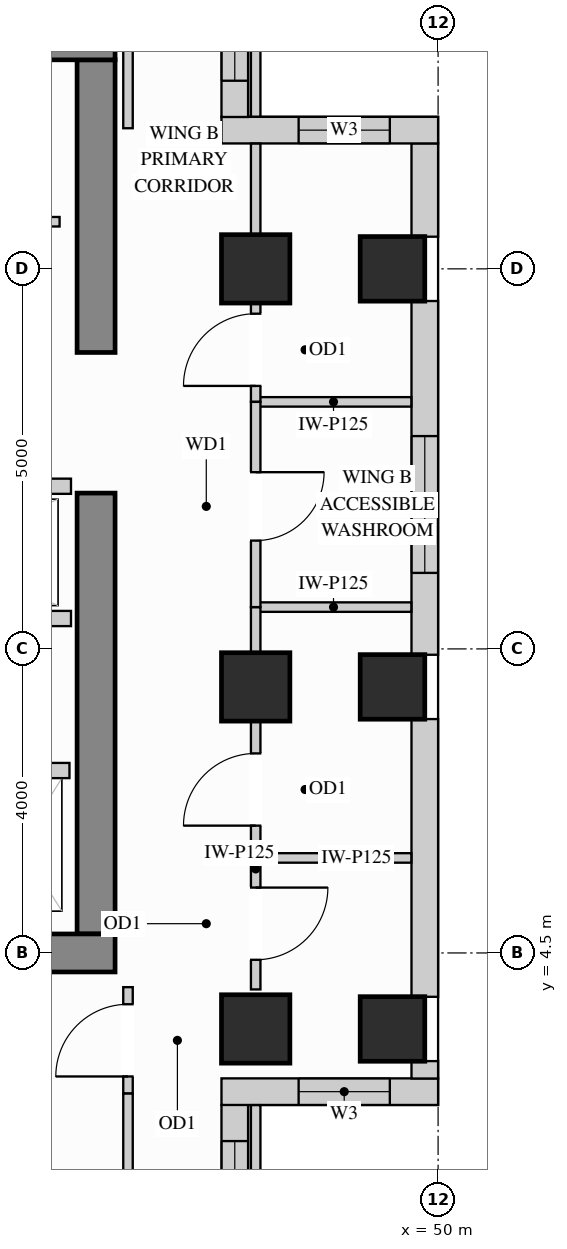
"""IFC4 building model, lengths in metres.
Left out: names, types, materials, properties, quantities, classifications, styles, units other than length and angle.
Written with IfcOpenShell. Run it as: python <this file> out.ifc"""

import sys

from ifc_helpers import new_model, si_unit, direction, frame, frame_2d, origin, origin_2d, place, context, subcontext, project, spatial, rectangle, extrude, source, transform, mapped, element, fill, save


model = new_model("IFC4")
c1 = context("Model", 3, precision=1e-05, world=origin(), true_north=direction((0.0, 1.0)))
c2 = subcontext(c1, "Body", "Model", "MODEL_VIEW")
j1 = project(units=[si_unit("LENGTHUNIT", "METRE"), si_unit("PLANEANGLEUNIT", "RADIAN")], contexts=[c1])
p1 = place(None, origin())
s1 = spatial("IfcSite", under=j1, at=p1, CompositionType="ELEMENT")
p2 = place(p1, origin())
s2 = spatial("IfcBuilding", under=s1, at=p2, CompositionType="ELEMENT")
p3 = place(p2, frame((0.0, 0.0, 223.2)))
s3 = spatial("IfcBuildingStorey", under=s2, at=p3, CompositionType="ELEMENT", Elevation=223.2)
m1 = source(origin(), c2, "Body", "SweptSolid", [
    extrude(rectangle(XDim=0.9, YDim=0.9, at=origin_2d()), origin(), (0.0, 0.0, 1.0), 3.4),
])
for number, where, z_axis, x_axis in (
    (1, (47.6, 13.5, 0.0), (0.0, 0.0, 1.0), (1.0, 0.0, 0.0)),
    (2, (47.6, 3.5, 0.0), (0.0, 0.0, 1.0), (1.0, 0.0, 0.0)),
    (3, (47.6, 8.0, 0.0), (0.0, 0.0, 1.0), (1.0, 0.0, 0.0)),
):
    element("IfcColumn", number, at=place(p3, frame(where, z_axis=z_axis, x_axis=x_axis)), inside=s3, PredefinedType="COLUMN", context=c2, shape_type="MappedRepresentation", body=[
        mapped(m1, transform((0.0, 0.0, 0.0), x_axis=(1.0, 0.0, 0.0), y_axis=(0.0, 1.0, 0.0), z_axis=(0.0, 0.0, 1.0))),
    ])
m2 = source(origin(), c2, "Body", "SweptSolid", [
    extrude(rectangle(XDim=0.85, YDim=0.85, at=origin_2d()), origin(), (0.0, 0.0, 1.0), 3.4),
])
for number, where, z_axis, x_axis in (
    (4, (49.4, 13.5, 0.0), (0.0, 0.0, 1.0), (1.0, 0.0, 0.0)),
    (5, (49.4, 3.5, 0.0), (0.0, 0.0, 1.0), (1.0, 0.0, 0.0)),
    (6, (49.4, 8.0, 0.0), (0.0, 0.0, 1.0), (1.0, 0.0, 0.0)),
):
    element("IfcColumn", number, at=place(p3, frame(where, z_axis=z_axis, x_axis=x_axis)), inside=s3, PredefinedType="COLUMN", context=c2, shape_type="MappedRepresentation", body=[
        mapped(m2, transform((0.0, 0.0, 0.0), x_axis=(1.0, 0.0, 0.0), y_axis=(0.0, 1.0, 0.0), z_axis=(0.0, 0.0, 1.0))),
    ])
m3 = source(origin(), c2, "Body", "SweptSolid", [
    extrude(rectangle(XDim=5.8, YDim=0.5, at=frame_2d((2.9, 0.0))), origin(), (0.0, 0.0, 1.0), 3.4),
])
p4 = place(p3, frame((45.5, 4.75, 0.0), z_axis=(0.0, 0.0, 1.0), x_axis=(0.0, 1.0, 0.0)))
e7 = element("IfcWall", 7, at=p4, inside=s3, PredefinedType="SHEAR", context=c2, shape_type="MappedRepresentation", body=[
    mapped(m3, transform((0.0, 0.0, 0.0), x_axis=(1.0, 0.0, 0.0), y_axis=(0.0, 1.0, 0.0), z_axis=(0.0, 0.0, 1.0))),
])
m4 = source(origin(), c2, "Body", "SweptSolid", [
    extrude(rectangle(XDim=3.85, YDim=0.5, at=frame_2d((1.925, 0.0))), origin(), (0.0, 0.0, 1.0), 3.4),
])
p5 = place(p3, frame((45.5, 12.4, 0.0), z_axis=(0.0, 0.0, 1.0), x_axis=(0.0, 1.0, 0.0)))
e8 = element("IfcWall", 8, at=p5, inside=s3, PredefinedType="SHEAR", context=c2, shape_type="MappedRepresentation", body=[
    mapped(m4, transform((0.0, 0.0, 0.0), x_axis=(1.0, 0.0, 0.0), y_axis=(0.0, 1.0, 0.0), z_axis=(0.0, 0.0, 1.0))),
])
m5 = source(origin(), c2, "Body", "SweptSolid", [
    extrude(rectangle(XDim=10.0, YDim=0.5, at=frame_2d((5.0, 0.0))), origin(), (0.0, 0.0, 1.0), 3.4),
])
for number, where, z_axis, x_axis in (
    (9, (35.75, 16.5, 0.0), (0.0, 0.0, 1.0), (1.0, 0.0, 0.0)),
    (10, (35.75, 4.5, 0.0), (0.0, 0.0, 1.0), (1.0, 0.0, 0.0)),
):
    element("IfcWall", number, at=place(p3, frame(where, z_axis=z_axis, x_axis=x_axis)), inside=s3, PredefinedType="SHEAR", context=c2, shape_type="MappedRepresentation", body=[
        mapped(m5, transform((0.0, 0.0, 0.0), x_axis=(1.0, 0.0, 0.0), y_axis=(0.0, 1.0, 0.0), z_axis=(0.0, 0.0, 1.0))),
    ])
p6 = place(p3, frame((47.325, 0.348, 0.0), z_axis=(0.0, 0.0, 1.0), x_axis=(0.0, 1.0, 0.0)))
e11 = element("IfcWall", 11, at=p6, inside=s3, PredefinedType="SOLIDWALL", context=c2, shape_type="SweptSolid", body=[
    extrude(rectangle(XDim=2.154, YDim=0.35, at=frame_2d((1.077, 0.0))), origin(), (0.0, 0.0, 1.0), 3.385),
])
p7 = place(p6, frame((0.477, 0.0, 0.78)))
e12 = element("IfcOpeningElement", 12, at=p7, cuts=e11, PredefinedType="OPENING", context=c2, shape_type="SweptSolid", body=[
    extrude(rectangle(XDim=1.2, YDim=2.1, at=frame_2d((0.6, 1.05))), frame((0.0, 0.185, 0.0), z_axis=(0.0, -1.0, 0.0), x_axis=(1.0, 0.0, 0.0)), (0.0, 0.0, 1.0), 0.37),
])
p8 = place(p3, frame((47.15, 2.675, 0.0), z_axis=(0.0, 0.0, 1.0), x_axis=(1.0, 0.0, 0.0)))
e13 = element("IfcWall", 13, at=p8, inside=s3, PredefinedType="SOLIDWALL", context=c2, shape_type="SweptSolid", body=[
    extrude(rectangle(XDim=2.85, YDim=0.35, at=frame_2d((1.425, 0.0))), origin(), (0.0, 0.0, 1.0), 3.385),
])
p9 = place(p8, frame((1.015, 0.0, 0.78)))
e14 = element("IfcOpeningElement", 14, at=p9, cuts=e13, PredefinedType="OPENING", context=c2, shape_type="SweptSolid", body=[
    extrude(rectangle(XDim=1.2, YDim=2.1, at=frame_2d((0.6, 1.05))), frame((0.0, 0.185, 0.0), z_axis=(0.0, -1.0, 0.0), x_axis=(1.0, 0.0, 0.0)), (0.0, 0.0, 1.0), 0.37),
])
m6 = source(origin(), c2, "Body", "SweptSolid", [
    extrude(rectangle(XDim=0.229, YDim=0.35, at=frame_2d((0.115, 0.0))), origin(), (0.0, 0.0, 1.0), 3.385),
])
p10 = place(p3, frame((49.825, 2.848, 0.0), z_axis=(0.0, 0.0, 1.0), x_axis=(0.0, 1.0, 0.0)))
e15 = element("IfcWall", 15, at=p10, inside=s3, PredefinedType="SOLIDWALL", context=c2, shape_type="MappedRepresentation", body=[
    mapped(m6, transform((0.0, 0.0, 0.0), x_axis=(1.0, 0.0, 0.0), y_axis=(0.0, 1.0, 0.0), z_axis=(0.0, 0.0, 1.0))),
])
m7 = source(origin(), c2, "Body", "SweptSolid", [
    extrude(rectangle(XDim=3.654, YDim=0.35, at=frame_2d((1.827, 0.0))), origin(), (0.0, 0.0, 1.0), 3.385),
])
p11 = place(p3, frame((49.825, 3.923, 0.0), z_axis=(0.0, 0.0, 1.0), x_axis=(0.0, 1.0, 0.0)))
e16 = element("IfcWall", 16, at=p11, inside=s3, PredefinedType="SOLIDWALL", context=c2, shape_type="MappedRepresentation", body=[
    mapped(m7, transform((0.0, 0.0, 0.0), x_axis=(1.0, 0.0, 0.0), y_axis=(0.0, 1.0, 0.0), z_axis=(0.0, 0.0, 1.0))),
])
p12 = place(p3, frame((49.825, 8.423, 0.0), z_axis=(0.0, 0.0, 1.0), x_axis=(0.0, 1.0, 0.0)))
e17 = element("IfcWall", 17, at=p12, inside=s3, PredefinedType="SOLIDWALL", context=c2, shape_type="SweptSolid", body=[
    extrude(rectangle(XDim=4.654, YDim=0.35, at=frame_2d((2.327, 0.0))), origin(), (0.0, 0.0, 1.0), 3.385),
])
p13 = place(p12, frame((1.077, 0.0, 0.78)))
e18 = element("IfcOpeningElement", 18, at=p13, cuts=e17, PredefinedType="OPENING", context=c2, shape_type="SweptSolid", body=[
    extrude(rectangle(XDim=1.8, YDim=2.1, at=frame_2d((0.9, 1.05))), frame((0.0, 0.185, 0.0), z_axis=(0.0, -1.0, 0.0), x_axis=(1.0, 0.0, 0.0)), (0.0, 0.0, 1.0), 0.37),
])
m8 = source(origin(), c2, "Body", "SweptSolid", [
    extrude(rectangle(XDim=1.229, YDim=0.35, at=frame_2d((0.615, 0.0))), origin(), (0.0, 0.0, 1.0), 3.385),
])
p14 = place(p3, frame((49.825, 13.923, 0.0), z_axis=(0.0, 0.0, 1.0), x_axis=(0.0, 1.0, 0.0)))
e19 = element("IfcWall", 19, at=p14, inside=s3, PredefinedType="SOLIDWALL", context=c2, shape_type="MappedRepresentation", body=[
    mapped(m8, transform((0.0, 0.0, 0.0), x_axis=(1.0, 0.0, 0.0), y_axis=(0.0, 1.0, 0.0), z_axis=(0.0, 0.0, 1.0))),
])
p15 = place(p3, frame((50.0, 15.325, 0.0), z_axis=(0.0, 0.0, 1.0), x_axis=(-1.0, 0.0, 0.0)))
e20 = element("IfcWall", 20, at=p15, inside=s3, PredefinedType="SOLIDWALL", context=c2, shape_type="SweptSolid", body=[
    extrude(rectangle(XDim=2.85, YDim=0.35, at=frame_2d((1.425, 0.0))), origin(), (0.0, 0.0, 1.0), 3.385),
])
p16 = place(p15, frame((0.635, 0.0, 0.78)))
e21 = element("IfcOpeningElement", 21, at=p16, cuts=e20, PredefinedType="OPENING", context=c2, shape_type="SweptSolid", body=[
    extrude(rectangle(XDim=1.2, YDim=2.1, at=frame_2d((0.6, 1.05))), frame((0.0, 0.185, 0.0), z_axis=(0.0, -1.0, 0.0), x_axis=(1.0, 0.0, 0.0)), (0.0, 0.0, 1.0), 0.37),
])
p17 = place(p3, frame((47.325, 15.498, 0.0), z_axis=(0.0, 0.0, 1.0), x_axis=(0.0, 1.0, 0.0)))
e22 = element("IfcWall", 22, at=p17, inside=s3, PredefinedType="SOLIDWALL", context=c2, shape_type="SweptSolid", body=[
    extrude(rectangle(XDim=2.154, YDim=0.35, at=frame_2d((1.077, 0.0))), origin(), (0.0, 0.0, 1.0), 3.385),
])
p18 = place(p17, frame((0.477, 0.0, 0.78)))
e23 = element("IfcOpeningElement", 23, at=p18, cuts=e22, PredefinedType="OPENING", context=c2, shape_type="SweptSolid", body=[
    extrude(rectangle(XDim=1.2, YDim=2.1, at=frame_2d((0.6, 1.05))), frame((0.0, 0.185, 0.0), z_axis=(0.0, -1.0, 0.0), x_axis=(1.0, 0.0, 0.0)), (0.0, 0.0, 1.0), 0.37),
])
p19 = place(p3, frame((36.5, 14.12, 0.0), z_axis=(0.0, 0.0, 1.0), x_axis=(1.0, 0.0, 0.0)))
e24 = element("IfcWall", 24, at=p19, inside=s3, PredefinedType="PARTITIONING", context=c2, shape_type="SweptSolid", body=[
    extrude(rectangle(XDim=8.52, YDim=0.125, at=frame_2d((4.26, 0.0))), origin(), (0.0, 0.0, 1.0), 3.385),
])
p20 = place(p19, frame((3.785, 0.0, 0.0)))
e25 = element("IfcOpeningElement", 25, at=p20, cuts=e24, PredefinedType="OPENING", context=c2, shape_type="SweptSolid", body=[
    extrude(rectangle(XDim=0.95, YDim=2.15, at=frame_2d((0.475, 1.075))), frame((0.0, 0.073, 0.0), z_axis=(0.0, -1.0, 0.0), x_axis=(1.0, 0.0, 0.0)), (0.0, 0.0, 1.0), 0.145),
])
m9 = source(origin(), c2, "Body", "SweptSolid", [
    extrude(rectangle(XDim=2.048, YDim=0.125, at=frame_2d((1.024, 0.0))), origin(), (0.0, 0.0, 1.0), 2.916),
])
p21 = place(p3, frame((47.6, 11.75, 0.0), z_axis=(0.0, 0.0, 1.0), x_axis=(1.0, 0.0, 0.0)))
e26 = element("IfcWall", 26, at=p21, inside=s3, PredefinedType="PARTITIONING", context=c2, shape_type="MappedRepresentation", body=[
    mapped(m9, transform((0.0, 0.0, 0.0), x_axis=(1.0, 0.0, 0.0), y_axis=(0.0, 1.0, 0.0), z_axis=(0.0, 0.0, 1.0))),
])
m10 = source(origin(), c2, "Body", "SweptSolid", [
    extrude(rectangle(XDim=2.048, YDim=0.125, at=frame_2d((1.024, 0.0))), origin(), (0.0, 0.0, 1.0), 3.385),
])
for number, where, z_axis, x_axis in (
    (27, (47.6, 5.75, 0.0), (0.0, 0.0, 1.0), (1.0, 0.0, 0.0)),
    (28, (47.6, 9.05, 0.0), (0.0, 0.0, 1.0), (1.0, 0.0, 0.0)),
):
    element("IfcWall", number, at=place(p3, frame(where, z_axis=z_axis, x_axis=x_axis)), inside=s3, PredefinedType="PARTITIONING", context=c2, shape_type="MappedRepresentation", body=[
        mapped(m10, transform((0.0, 0.0, 0.0), x_axis=(1.0, 0.0, 0.0), y_axis=(0.0, 1.0, 0.0), z_axis=(0.0, 0.0, 1.0))),
    ])
p22 = place(p3, frame((47.6, 4.02, 0.0), z_axis=(0.0, 0.0, 1.0), x_axis=(0.0, 1.0, 0.0)))
e29 = element("IfcWall", 29, at=p22, inside=s3, PredefinedType="PARTITIONING", context=c2, shape_type="SweptSolid", body=[
    extrude(rectangle(XDim=1.73, YDim=0.125, at=frame_2d((0.865, 0.0))), origin(), (0.0, 0.0, 1.0), 2.773),
])
p23 = place(p22, frame((0.39, 0.0, 0.0)))
e30 = element("IfcOpeningElement", 30, at=p23, cuts=e29, PredefinedType="OPENING", context=c2, shape_type="SweptSolid", body=[
    extrude(rectangle(XDim=0.95, YDim=2.15, at=frame_2d((0.475, 1.075))), frame((0.0, 0.073, 0.0), z_axis=(0.0, -1.0, 0.0), x_axis=(1.0, 0.0, 0.0)), (0.0, 0.0, 1.0), 0.145),
])
m11 = source(origin(), c2, "Body", "SweptSolid", [
    extrude(rectangle(XDim=2.148, YDim=0.125, at=frame_2d((1.074, 0.0))), origin(), (0.0, 0.0, 1.0), 3.385),
])
p24 = place(p3, frame((47.6, 0.35, 0.0), z_axis=(0.0, 0.0, 1.0), x_axis=(0.0, 1.0, 0.0)))
e31 = element("IfcWall", 31, at=p24, inside=s3, PredefinedType="PARTITIONING", context=c2, shape_type="MappedRepresentation", body=[
    mapped(m11, transform((0.0, 0.0, 0.0), x_axis=(1.0, 0.0, 0.0), y_axis=(0.0, 1.0, 0.0), z_axis=(0.0, 0.0, 1.0))),
])
p25 = place(p3, frame((47.6, 5.75, 0.0), z_axis=(0.0, 0.0, 1.0), x_axis=(0.0, 1.0, 0.0)))
e32 = element("IfcWall", 32, at=p25, inside=s3, PredefinedType="PARTITIONING", context=c2, shape_type="SweptSolid", body=[
    extrude(rectangle(XDim=1.8, YDim=0.125, at=frame_2d((0.9, 0.0))), origin(), (0.0, 0.0, 1.0), 2.773),
])
p26 = place(p25, frame((0.425, 0.0, 0.0)))
e33 = element("IfcOpeningElement", 33, at=p26, cuts=e32, PredefinedType="OPENING", context=c2, shape_type="SweptSolid", body=[
    extrude(rectangle(XDim=0.95, YDim=2.15, at=frame_2d((0.475, 1.075))), frame((0.0, 0.073, 0.0), z_axis=(0.0, -1.0, 0.0), x_axis=(1.0, 0.0, 0.0)), (0.0, 0.0, 1.0), 0.145),
])
m12 = source(origin(), c2, "Body", "SweptSolid", [
    extrude(rectangle(XDim=0.6, YDim=0.125, at=frame_2d((0.3, 0.0))), origin(), (0.0, 0.0, 1.0), 2.773),
])
p27 = place(p3, frame((47.6, 8.45, 0.0), z_axis=(0.0, 0.0, 1.0), x_axis=(0.0, 1.0, 0.0)))
e34 = element("IfcWall", 34, at=p27, inside=s3, PredefinedType="PARTITIONING", context=c2, shape_type="MappedRepresentation", body=[
    mapped(m12, transform((0.0, 0.0, 0.0), x_axis=(1.0, 0.0, 0.0), y_axis=(0.0, 1.0, 0.0), z_axis=(0.0, 0.0, 1.0))),
])
p28 = place(p3, frame((47.6, 11.75, 0.0), z_axis=(0.0, 0.0, 1.0), x_axis=(0.0, 1.0, 0.0)))
e35 = element("IfcWall", 35, at=p28, inside=s3, PredefinedType="PARTITIONING", context=c2, shape_type="SweptSolid", body=[
    extrude(rectangle(XDim=1.3, YDim=0.125, at=frame_2d((0.65, 0.0))), origin(), (0.0, 0.0, 1.0), 2.773),
])
p29 = place(p28, frame((0.21, 0.0, 0.0)))
e36 = element("IfcOpeningElement", 36, at=p29, cuts=e35, PredefinedType="OPENING", context=c2, shape_type="SweptSolid", body=[
    extrude(rectangle(XDim=0.95, YDim=2.15, at=frame_2d((0.475, 1.075))), frame((0.0, 0.073, 0.0), z_axis=(0.0, -1.0, 0.0), x_axis=(1.0, 0.0, 0.0)), (0.0, 0.0, 1.0), 0.145),
])
m13 = source(origin(), c2, "Body", "SweptSolid", [
    extrude(rectangle(XDim=1.198, YDim=0.125, at=frame_2d((0.599, 0.0))), origin(), (0.0, 0.0, 1.0), 3.385),
])
p30 = place(p3, frame((47.6, 13.95, 0.0), z_axis=(0.0, 0.0, 1.0), x_axis=(0.0, 1.0, 0.0)))
e37 = element("IfcWall", 37, at=p30, inside=s3, PredefinedType="PARTITIONING", context=c2, shape_type="MappedRepresentation", body=[
    mapped(m13, transform((0.0, 0.0, 0.0), x_axis=(1.0, 0.0, 0.0), y_axis=(0.0, 1.0, 0.0), z_axis=(0.0, 0.0, 1.0))),
])
p31 = place(p3, frame((47.6, 15.502, 0.0), z_axis=(0.0, 0.0, 1.0), x_axis=(0.0, 1.0, 0.0)))
e38 = element("IfcWall", 38, at=p31, inside=s3, PredefinedType="PARTITIONING", context=c2, shape_type="MappedRepresentation", body=[
    mapped(m11, transform((0.0, 0.0, 0.0), x_axis=(1.0, 0.0, 0.0), y_axis=(0.0, 1.0, 0.0), z_axis=(0.0, 0.0, 1.0))),
])
p32 = place(p3, frame((47.6, 9.05, 0.0), z_axis=(0.0, 0.0, 1.0), x_axis=(0.0, 1.0, 0.0)))
e39 = element("IfcWall", 39, at=p32, inside=s3, PredefinedType="PARTITIONING", context=c2, shape_type="SweptSolid", body=[
    extrude(rectangle(XDim=2.7, YDim=0.125, at=frame_2d((1.35, 0.0))), origin(), (0.0, 0.0, 1.0), 2.773),
])
p33 = place(p32, frame((0.875, 0.0, 0.0)))
e40 = element("IfcOpeningElement", 40, at=p33, cuts=e39, PredefinedType="OPENING", context=c2, shape_type="SweptSolid", body=[
    extrude(rectangle(XDim=0.9, YDim=2.15, at=frame_2d((0.45, 1.075))), frame((0.0, 0.073, 0.0), z_axis=(0.0, -1.0, 0.0), x_axis=(1.0, 0.0, 0.0)), (0.0, 0.0, 1.0), 0.145),
])
m14 = source(origin(), c2, "Body", "SweptSolid", [
    extrude(rectangle(XDim=2.298, YDim=0.125, at=frame_2d((1.149, 0.0))), origin(), (0.0, 0.0, 1.0), 3.385),
])
p34 = place(p3, frame((45.92, 15.35, 0.0), z_axis=(0.0, 0.0, 1.0), x_axis=(0.0, 1.0, 0.0)))
e41 = element("IfcWall", 41, at=p34, inside=s3, PredefinedType="PARTITIONING", context=c2, shape_type="MappedRepresentation", body=[
    mapped(m14, transform((0.0, 0.0, 0.0), x_axis=(1.0, 0.0, 0.0), y_axis=(0.0, 1.0, 0.0), z_axis=(0.0, 0.0, 1.0))),
])
p35 = place(p3, frame((45.92, 2.65, 0.0), z_axis=(0.0, 0.0, 1.0), x_axis=(0.0, 1.0, 0.0)))
e42 = element("IfcWall", 42, at=p35, inside=s3, PredefinedType="PARTITIONING", context=c2, shape_type="SweptSolid", body=[
    extrude(rectangle(XDim=1.4, YDim=0.125, at=frame_2d((0.7, 0.0))), origin(), (0.0, 0.0, 1.0), 3.385),
])
p36 = place(p35, frame((0.225, 0.0, 0.0)))
e43 = element("IfcOpeningElement", 43, at=p36, cuts=e42, PredefinedType="OPENING", context=c2, shape_type="SweptSolid", body=[
    extrude(rectangle(XDim=0.95, YDim=2.15, at=frame_2d((0.475, 1.075))), frame((0.0, 0.073, 0.0), z_axis=(0.0, -1.0, 0.0), x_axis=(1.0, 0.0, 0.0)), (0.0, 0.0, 1.0), 0.145),
])
p37 = place(p3, frame((45.92, 0.352, 0.0), z_axis=(0.0, 0.0, 1.0), x_axis=(0.0, 1.0, 0.0)))
e44 = element("IfcWall", 44, at=p37, inside=s3, PredefinedType="PARTITIONING", context=c2, shape_type="MappedRepresentation", body=[
    mapped(m14, transform((0.0, 0.0, 0.0), x_axis=(1.0, 0.0, 0.0), y_axis=(0.0, 1.0, 0.0), z_axis=(0.0, 0.0, 1.0))),
])
m15 = source(origin(), c2, "Body", "SweptSolid", [
    extrude(rectangle(XDim=1.3, YDim=0.2, at=frame_2d((0.65, 0.0))), origin(), (0.0, 0.0, 1.0), 3.385),
])
p38 = place(p3, frame((43.85, 6.9, 0.0), z_axis=(0.0, 0.0, 1.0), x_axis=(1.0, 0.0, 0.0)))
e45 = element("IfcWall", 45, at=p38, inside=s3, PredefinedType="PARTITIONING", context=c2, shape_type="MappedRepresentation", body=[
    mapped(m15, transform((0.0, 0.0, 0.0), x_axis=(1.0, 0.0, 0.0), y_axis=(0.0, 1.0, 0.0), z_axis=(0.0, 0.0, 1.0))),
])
m16 = source(origin(), c2, "Body", "SweptSolid", [
    extrude(rectangle(XDim=3.49, YDim=0.2, at=frame_2d((1.745, 0.0))), origin(), (0.0, 0.0, 1.0), 3.385),
])
for number, where, z_axis, x_axis in (
    (46, (41.68, 10.64, 0.0), (0.0, 0.0, 1.0), (1.0, 0.0, 0.0)),
    (47, (41.68, 8.9, 0.0), (0.0, 0.0, 1.0), (1.0, 0.0, 0.0)),
):
    element("IfcWall", number, at=place(p3, frame(where, z_axis=z_axis, x_axis=x_axis)), inside=s3, PredefinedType="PARTITIONING", context=c2, shape_type="MappedRepresentation", body=[
        mapped(m16, transform((0.0, 0.0, 0.0), x_axis=(1.0, 0.0, 0.0), y_axis=(0.0, 1.0, 0.0), z_axis=(0.0, 0.0, 1.0))),
    ])
m17 = source(origin(), c2, "Body", "SweptSolid", [
    extrude(rectangle(XDim=0.95, YDim=2.15, at=frame_2d((0.475, 1.075))), frame((0.0, 0.025, 0.0), z_axis=(0.0, -1.0, 0.0), x_axis=(1.0, 0.0, 0.0)), (0.0, 0.0, 1.0), 0.05),
])
p39 = place(p36, origin())
e48 = element("IfcDoor", 48, at=p39, inside=s3, OperationType="SINGLE_SWING_LEFT", PredefinedType="DOOR", context=c2, shape_type="MappedRepresentation", body=[
    mapped(m17, transform((0.0, 0.0, 0.0), x_axis=(1.0, 0.0, 0.0), y_axis=(0.0, 1.0, 0.0), z_axis=(0.0, 0.0, 1.0))),
])
fill(e43, e48)
p40 = place(p23, origin())
e49 = element("IfcDoor", 49, at=p40, inside=s3, OperationType="SINGLE_SWING_RIGHT", PredefinedType="DOOR", context=c2, shape_type="MappedRepresentation", body=[
    mapped(m17, transform((0.0, 0.0, 0.0), x_axis=(1.0, 0.0, 0.0), y_axis=(0.0, 1.0, 0.0), z_axis=(0.0, 0.0, 1.0))),
])
fill(e30, e49)
p41 = place(p26, origin())
e50 = element("IfcDoor", 50, at=p41, inside=s3, OperationType="SINGLE_SWING_LEFT", PredefinedType="DOOR", context=c2, shape_type="MappedRepresentation", body=[
    mapped(m17, transform((0.0, 0.0, 0.0), x_axis=(1.0, 0.0, 0.0), y_axis=(0.0, 1.0, 0.0), z_axis=(0.0, 0.0, 1.0))),
])
fill(e33, e50)
p42 = place(p29, origin())
e51 = element("IfcDoor", 51, at=p42, inside=s3, OperationType="SINGLE_SWING_LEFT", PredefinedType="DOOR", context=c2, shape_type="MappedRepresentation", body=[
    mapped(m17, transform((0.0, 0.0, 0.0), x_axis=(1.0, 0.0, 0.0), y_axis=(0.0, 1.0, 0.0), z_axis=(0.0, 0.0, 1.0))),
])
fill(e36, e51)
m18 = source(origin(), c2, "Body", "SweptSolid", [
    extrude(rectangle(XDim=0.9, YDim=2.15, at=frame_2d((0.45, 1.075))), frame((0.0, 0.025, 0.0), z_axis=(0.0, -1.0, 0.0), x_axis=(1.0, 0.0, 0.0)), (0.0, 0.0, 1.0), 0.05),
])
p43 = place(p33, origin())
e52 = element("IfcDoor", 52, at=p43, inside=s3, OperationType="SINGLE_SWING_RIGHT", PredefinedType="DOOR", context=c2, shape_type="MappedRepresentation", body=[
    mapped(m18, transform((0.0, 0.0, 0.0), x_axis=(1.0, 0.0, 0.0), y_axis=(0.0, 1.0, 0.0), z_axis=(0.0, 0.0, 1.0))),
])
fill(e40, e52)
m19 = source(origin(), c2, "Body", "SweptSolid", [
    extrude(rectangle(XDim=1.8, YDim=2.1, at=frame_2d((0.9, 1.05))), frame((0.0, 0.03, 0.0), z_axis=(0.0, -1.0, 0.0), x_axis=(1.0, 0.0, 0.0)), (0.0, 0.0, 1.0), 0.06),
])
p44 = place(p13, origin())
e53 = element("IfcWindow", 53, at=p44, inside=s3, PartitioningType="SINGLE_PANEL", PredefinedType="WINDOW", context=c2, shape_type="MappedRepresentation", body=[
    mapped(m19, transform((0.0, 0.0, 0.0), x_axis=(1.0, 0.0, 0.0), y_axis=(0.0, 1.0, 0.0), z_axis=(0.0, 0.0, 1.0))),
])
fill(e18, e53)
m20 = source(origin(), c2, "Body", "SweptSolid", [
    extrude(rectangle(XDim=1.2, YDim=2.1, at=frame_2d((0.6, 1.05))), frame((0.0, 0.03, 0.0), z_axis=(0.0, -1.0, 0.0), x_axis=(1.0, 0.0, 0.0)), (0.0, 0.0, 1.0), 0.06),
])
p45 = place(p7, origin())
e54 = element("IfcWindow", 54, at=p45, inside=s3, PartitioningType="SINGLE_PANEL", PredefinedType="WINDOW", context=c2, shape_type="MappedRepresentation", body=[
    mapped(m20, transform((0.0, 0.0, 0.0), x_axis=(1.0, 0.0, 0.0), y_axis=(0.0, 1.0, 0.0), z_axis=(0.0, 0.0, 1.0))),
])
fill(e12, e54)
p46 = place(p9, origin())
e55 = element("IfcWindow", 55, at=p46, inside=s3, PartitioningType="SINGLE_PANEL", PredefinedType="WINDOW", context=c2, shape_type="MappedRepresentation", body=[
    mapped(m20, transform((0.0, 0.0, 0.0), x_axis=(1.0, 0.0, 0.0), y_axis=(0.0, 1.0, 0.0), z_axis=(0.0, 0.0, 1.0))),
])
fill(e14, e55)
p47 = place(p16, origin())
e56 = element("IfcWindow", 56, at=p47, inside=s3, PartitioningType="SINGLE_PANEL", PredefinedType="WINDOW", context=c2, shape_type="MappedRepresentation", body=[
    mapped(m20, transform((0.0, 0.0, 0.0), x_axis=(1.0, 0.0, 0.0), y_axis=(0.0, 1.0, 0.0), z_axis=(0.0, 0.0, 1.0))),
])
fill(e21, e56)
p48 = place(p18, origin())
e57 = element("IfcWindow", 57, at=p48, inside=s3, PartitioningType="SINGLE_PANEL", PredefinedType="WINDOW", context=c2, shape_type="MappedRepresentation", body=[
    mapped(m20, transform((0.0, 0.0, 0.0), x_axis=(1.0, 0.0, 0.0), y_axis=(0.0, 1.0, 0.0), z_axis=(0.0, 0.0, 1.0))),
])
fill(e23, e57)
save(model, sys.argv[1])
